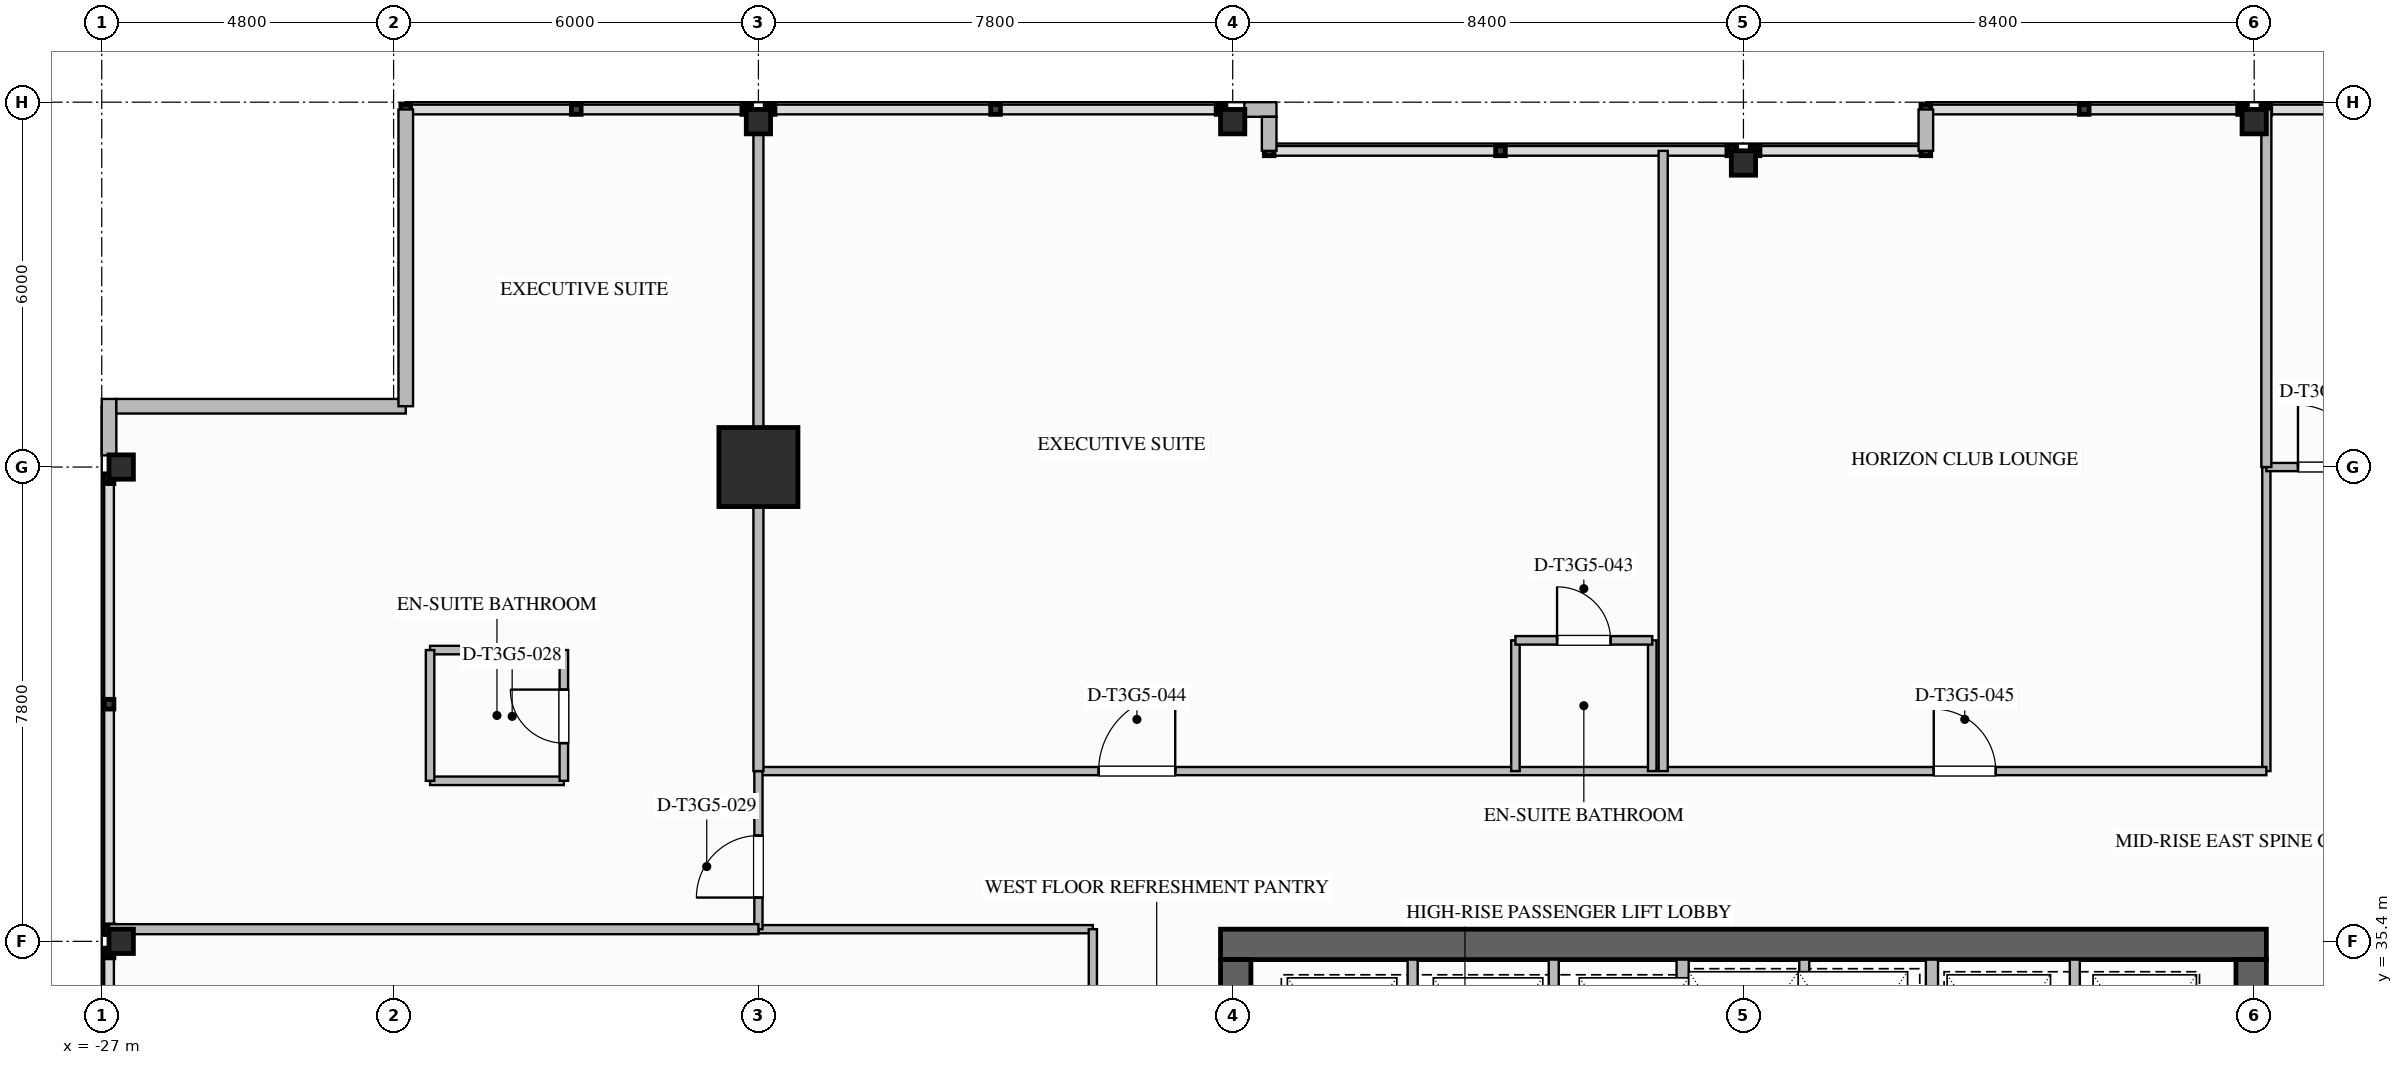
"""IFC4 building model, lengths in metres.
Left out: names, types, materials, properties, quantities, classifications, styles, units other than length and angle.
Written with IfcOpenShell. Run it as: python <this file> out.ifc"""

import sys

from ifc_helpers import new_model, si_unit, direction, frame, frame_2d, origin, origin_2d, place, context, subcontext, project, spatial, rectangle, i_section, extrude, element, fill, save


model = new_model("IFC4")
c1 = context("Model", 3, precision=1e-05, world=origin(), true_north=direction((0.0, 1.0)))
c2 = subcontext(c1, "Body", "Model", "MODEL_VIEW")
j1 = project(units=[si_unit("LENGTHUNIT", "METRE"), si_unit("PLANEANGLEUNIT", "RADIAN")], contexts=[c1])
p1 = place(None, origin())
s1 = spatial("IfcSite", under=j1, at=p1, CompositionType="ELEMENT")
p2 = place(p1, origin())
s2 = spatial("IfcBuilding", under=s1, at=p2, CompositionType="ELEMENT")
p3 = place(p2, frame((0.0, 0.0, 193.0)))
s3 = spatial("IfcBuildingStorey", under=s2, at=p3, CompositionType="ELEMENT", Elevation=193.0)
p4 = place(p3, frame((-8.6, 35.35, 0.0), z_axis=(0.0, 0.0, 1.0), x_axis=(1.0, 0.0, 0.0)))
e1 = element("IfcWall", 1, at=p4, inside=s3, PredefinedType="SHEAR", context=c2, shape_type="SweptSolid", body=[
    extrude(rectangle(XDim=17.2, YDim=0.5, at=frame_2d((8.6, 0.0))), origin(), (0.0, 0.0, 1.0), 3.55),
])
p5 = place(p3, frame((8.35, 35.1, 0.0), z_axis=(0.0, 0.0, 1.0), x_axis=(0.0, -1.0, 0.0)))
e2 = element("IfcWall", 2, at=p5, inside=s3, PredefinedType="SHEAR", context=c2, shape_type="SweptSolid", body=[
    extrude(rectangle(XDim=16.2, YDim=0.5, at=frame_2d((8.1, 0.0))), origin(), (0.0, 0.0, 1.0), 3.55),
])
p6 = place(p5, frame((3.08, 0.0, 0.0)))
e3 = element("IfcOpeningElement", 3, at=p6, cuts=e2, PredefinedType="OPENING", context=c2, shape_type="SweptSolid", body=[
    extrude(rectangle(XDim=1.12, YDim=2.1, at=frame_2d((0.56, 1.05))), frame((0.0, 0.26, 0.0), z_axis=(0.0, -1.0, 0.0), x_axis=(1.0, 0.0, 0.0)), (0.0, 0.0, 1.0), 0.52),
])
p7 = place(p5, frame((10.62, 0.0, 0.0)))
e4 = element("IfcOpeningElement", 4, at=p7, cuts=e2, PredefinedType="OPENING", context=c2, shape_type="SweptSolid", body=[
    extrude(rectangle(XDim=1.08, YDim=2.04, at=frame_2d((0.54, 1.02))), frame((0.0, 0.26, 0.0), z_axis=(0.0, -1.0, 0.0), x_axis=(1.0, 0.0, 0.0)), (0.0, 0.0, 1.0), 0.52),
])
p8 = place(p3, frame((-8.35, 18.9, 0.0), z_axis=(0.0, 0.0, 1.0), x_axis=(0.0, 1.0, 0.0)))
e5 = element("IfcWall", 5, at=p8, inside=s3, PredefinedType="SHEAR", context=c2, shape_type="SweptSolid", body=[
    extrude(rectangle(XDim=16.2, YDim=0.5, at=frame_2d((8.1, 0.0))), origin(), (0.0, 0.0, 1.0), 3.55),
])
p9 = place(p8, frame((12.02, 0.0, 0.0)))
e6 = element("IfcOpeningElement", 6, at=p9, cuts=e5, PredefinedType="OPENING", context=c2, shape_type="SweptSolid", body=[
    extrude(rectangle(XDim=1.08, YDim=2.04, at=frame_2d((0.54, 1.02))), frame((0.0, 0.26, 0.0), z_axis=(0.0, -1.0, 0.0), x_axis=(1.0, 0.0, 0.0)), (0.0, 0.0, 1.0), 0.52),
])
p10 = place(p8, frame((4.5, 0.0, 0.0)))
e7 = element("IfcOpeningElement", 7, at=p10, cuts=e5, PredefinedType="OPENING", context=c2, shape_type="SweptSolid", body=[
    extrude(rectangle(XDim=1.08, YDim=2.04, at=frame_2d((0.54, 1.02))), frame((0.0, 0.26, 0.0), z_axis=(0.0, -1.0, 0.0), x_axis=(1.0, 0.0, 0.0)), (0.0, 0.0, 1.0), 0.52),
])
p11 = place(p3, frame((-16.2, 43.2, 0.0), z_axis=(0.0, 0.0, 1.0), x_axis=(1.0, 0.0, 0.0)))
e8 = element("IfcColumn", 8, at=p11, inside=s3, PredefinedType="COLUMN", context=c2, shape_type="SweptSolid", body=[
    extrude(rectangle(XDim=1.3, YDim=1.3, at=origin_2d()), origin(), (0.0, 0.0, 1.0), 3.55),
])
for number, where, z_axis, x_axis in (
    (9, (-26.68, 35.4, 0.0), (0.0, 0.0, 1.0), (1.0, 0.0, 0.0)),
    (10, (-26.68, 43.2, 0.0), (0.0, 0.0, 1.0), (1.0, 0.0, 0.0)),
    (11, (-16.2, 48.88, 0.0), (0.0, 0.0, 1.0), (0.0, 1.0, 0.0)),
    (12, (-8.4, 48.88, 0.0), (0.0, 0.0, 1.0), (0.0, 1.0, 0.0)),
    (13, (0.0, 48.2, 0.0), (0.0, 0.0, 1.0), (0.0, 1.0, 0.0)),
    (14, (8.4, 48.88, 0.0), (0.0, 0.0, 1.0), (0.0, 1.0, 0.0)),
):
    element("IfcColumn", number, at=place(p3, frame(where, z_axis=z_axis, x_axis=x_axis)), inside=s3, PredefinedType="COLUMN", context=c2, shape_type="SweptSolid", body=[
        extrude(i_section(OverallWidth=0.401, OverallDepth=0.399, WebThickness=0.025, FlangeThickness=0.04, FilletRadius=0.025, at=origin_2d()), origin(), (0.0, 0.0, 1.0), 3.547),
    ])
p12 = place(p3, frame((-26.88, 43.392, 0.0), z_axis=(0.0, 0.0, 1.0), x_axis=(0.0, 1.0, 0.0)))
e15 = element("IfcWall", 15, at=p12, inside=s3, PredefinedType="STANDARD", context=c2, shape_type="SweptSolid", body=[
    extrude(rectangle(XDim=0.928, YDim=0.24, at=frame_2d((0.464, 0.0))), origin(), (0.0, 0.0, 1.0), 3.29),
])
p13 = place(p3, frame((-8.208, 49.08, 0.0), z_axis=(0.0, 0.0, 1.0), x_axis=(1.0, 0.0, 0.0)))
e16 = element("IfcWall", 16, at=p13, inside=s3, PredefinedType="STANDARD", context=c2, shape_type="SweptSolid", body=[
    extrude(rectangle(XDim=0.528, YDim=0.24, at=frame_2d((0.264, 0.0))), origin(), (0.0, 0.0, 1.0), 3.29),
])
p14 = place(p3, frame((-26.76, 44.2, 0.0), z_axis=(0.0, 0.0, 1.0), x_axis=(1.0, 0.0, 0.0)))
e17 = element("IfcWall", 17, at=p14, inside=s3, PredefinedType="STANDARD", context=c2, shape_type="SweptSolid", body=[
    extrude(rectangle(XDim=4.76, YDim=0.24, at=frame_2d((2.38, 0.0))), origin(), (0.0, 0.0, 1.0), 3.29),
])
p15 = place(p3, frame((-22.0, 44.2, 0.0), z_axis=(0.0, 0.0, 1.0), x_axis=(0.0, 1.0, 0.0)))
e18 = element("IfcWall", 18, at=p15, inside=s3, PredefinedType="STANDARD", context=c2, shape_type="SweptSolid", body=[
    extrude(rectangle(XDim=4.88, YDim=0.24, at=frame_2d((2.44, 0.0))), origin(), (0.0, 0.0, 1.0), 3.29),
])
p16 = place(p3, frame((-7.8, 48.96, 0.0), z_axis=(0.0, 0.0, 1.0), x_axis=(0.0, -1.0, 0.0)))
e19 = element("IfcWall", 19, at=p16, inside=s3, PredefinedType="STANDARD", context=c2, shape_type="SweptSolid", body=[
    extrude(rectangle(XDim=0.56, YDim=0.24, at=frame_2d((0.28, 0.0))), origin(), (0.0, 0.0, 1.0), 3.29),
])
p17 = place(p3, frame((3.0, 48.4, 0.0), z_axis=(0.0, 0.0, 1.0), x_axis=(0.0, 1.0, 0.0)))
e20 = element("IfcWall", 20, at=p17, inside=s3, PredefinedType="STANDARD", context=c2, shape_type="SweptSolid", body=[
    extrude(rectangle(XDim=0.68, YDim=0.24, at=frame_2d((0.34, 0.0))), origin(), (0.0, 0.0, 1.0), 3.29),
])
p18 = place(p3, frame((3.1, 32.22, 0.0), z_axis=(0.0, 0.0, 1.0), x_axis=(0.0, 1.0, 0.0)))
e21 = element("IfcWall", 21, at=p18, inside=s3, PredefinedType="SOLIDWALL", context=c2, shape_type="SweptSolid", body=[
    extrude(rectangle(XDim=2.88, YDim=0.2, at=frame_2d((1.44, 0.0))), origin(), (0.0, 0.0, 1.0), 3.29),
])
p19 = place(p3, frame((5.45, 32.22, 0.0), z_axis=(0.0, 0.0, 1.0), x_axis=(0.0, 1.0, 0.0)))
e22 = element("IfcWall", 22, at=p19, inside=s3, PredefinedType="PARTITIONING", context=c2, shape_type="SweptSolid", body=[
    extrude(rectangle(XDim=2.88, YDim=0.165, at=frame_2d((1.44, 0.0))), origin(), (0.0, 0.0, 1.0), 3.29),
])
p20 = place(p3, frame((-1.0, 32.18, 0.0), z_axis=(0.0, 0.0, 1.0), x_axis=(0.0, 1.0, 0.0)))
e23 = element("IfcWall", 23, at=p20, inside=s3, PredefinedType="SOLIDWALL", context=c2, shape_type="SweptSolid", body=[
    extrude(rectangle(XDim=2.92, YDim=0.2, at=frame_2d((1.46, 0.0))), origin(), (0.0, 0.0, 1.0), 3.29),
])
p21 = place(p3, frame((1.0, 32.18, 0.0), z_axis=(0.0, 0.0, 1.0), x_axis=(0.0, 1.0, 0.0)))
e24 = element("IfcWall", 24, at=p21, inside=s3, PredefinedType="PARTITIONING", context=c2, shape_type="SweptSolid", body=[
    extrude(rectangle(XDim=2.92, YDim=0.165, at=frame_2d((1.46, 0.0))), origin(), (0.0, 0.0, 1.0), 3.29),
])
for number, where, z_axis, x_axis in (
    (25, (-5.44, 32.22, 0.0), (0.0, 0.0, 1.0), (0.0, 1.0, 0.0)),
    (26, (-3.12, 32.22, 0.0), (0.0, 0.0, 1.0), (0.0, 1.0, 0.0)),
):
    element("IfcWall", number, at=place(p3, frame(where, z_axis=z_axis, x_axis=x_axis)), inside=s3, PredefinedType="PARTITIONING", context=c2, shape_type="SweptSolid", body=[
        extrude(rectangle(XDim=2.88, YDim=0.165, at=frame_2d((1.44, 0.0))), origin(), (0.0, 0.0, 1.0), 3.29),
    ])
p22 = place(p3, frame((8.6, 38.2, 0.0), z_axis=(0.0, 0.0, 1.0), x_axis=(0.0, 1.0, 0.0)))
e27 = element("IfcWall", 27, at=p22, inside=s3, PredefinedType="PARTITIONING", context=c2, shape_type="SweptSolid", body=[
    extrude(rectangle(XDim=5.0, YDim=0.135, at=frame_2d((2.5, 0.0))), origin(), (0.0, 0.0, 1.0), 2.667),
])
p23 = place(p3, frame((-16.2, 35.6, 0.0), z_axis=(0.0, 0.0, 1.0), x_axis=(1.0, 0.0, 0.0)))
e28 = element("IfcWall", 28, at=p23, inside=s3, PredefinedType="PARTITIONING", context=c2, shape_type="SweptSolid", body=[
    extrude(rectangle(XDim=5.5, YDim=0.135, at=frame_2d((2.75, 0.0))), origin(), (0.0, 0.0, 1.0), 2.667),
])
p24 = place(p3, frame((-16.2, 38.2, 0.0), z_axis=(0.0, 0.0, 1.0), x_axis=(1.0, 0.0, 0.0)))
e29 = element("IfcWall", 29, at=p24, inside=s3, PredefinedType="PARTITIONING", context=c2, shape_type="SweptSolid", body=[
    extrude(rectangle(XDim=24.8, YDim=0.135, at=frame_2d((12.4, 0.0))), origin(), (0.0, 0.0, 1.0), 3.29),
])
p25 = place(p24, frame((5.595, 0.0, 0.0)))
e30 = element("IfcOpeningElement", 30, at=p25, cuts=e29, PredefinedType="OPENING", context=c2, shape_type="SweptSolid", body=[
    extrude(rectangle(XDim=1.26, YDim=2.2, at=frame_2d((0.63, 1.1))), frame((0.0, 0.077, 0.0), z_axis=(0.0, -1.0, 0.0), x_axis=(1.0, 0.0, 0.0)), (0.0, 0.0, 1.0), 0.155),
])
p26 = place(p24, frame((19.33, 0.0, 0.0)))
e31 = element("IfcOpeningElement", 31, at=p26, cuts=e29, PredefinedType="OPENING", context=c2, shape_type="SweptSolid", body=[
    extrude(rectangle(XDim=1.02, YDim=2.15, at=frame_2d((0.51, 1.075))), frame((0.0, 0.077, 0.0), z_axis=(0.0, -1.0, 0.0), x_axis=(1.0, 0.0, 0.0)), (0.0, 0.0, 1.0), 0.155),
])
p27 = place(p3, frame((-10.7, 18.4, 0.0), z_axis=(0.0, 0.0, 1.0), x_axis=(0.0, 1.0, 0.0)))
e32 = element("IfcWall", 32, at=p27, inside=s3, PredefinedType="PARTITIONING", context=c2, shape_type="SweptSolid", body=[
    extrude(rectangle(XDim=17.2, YDim=0.135, at=frame_2d((8.6, 0.0))), origin(), (0.0, 0.0, 1.0), 3.29),
])
p28 = place(p27, frame((4.255, 0.0, 0.0)))
e33 = element("IfcOpeningElement", 33, at=p28, cuts=e32, PredefinedType="OPENING", context=c2, shape_type="SweptSolid", body=[
    extrude(rectangle(XDim=1.26, YDim=2.2, at=frame_2d((0.63, 1.1))), frame((0.0, 0.077, 0.0), z_axis=(0.0, -1.0, 0.0), x_axis=(1.0, 0.0, 0.0)), (0.0, 0.0, 1.0), 0.155),
])
p29 = place(p27, frame((11.685, 0.0, 0.0)))
e34 = element("IfcOpeningElement", 34, at=p29, cuts=e32, PredefinedType="OPENING", context=c2, shape_type="SweptSolid", body=[
    extrude(rectangle(XDim=1.26, YDim=2.2, at=frame_2d((0.63, 1.1))), frame((0.0, 0.077, 0.0), z_axis=(0.0, -1.0, 0.0), x_axis=(1.0, 0.0, 0.0)), (0.0, 0.0, 1.0), 0.155),
])
p30 = place(p3, frame((-16.2, 35.6, 0.0), z_axis=(0.0, 0.0, 1.0), x_axis=(0.0, 1.0, 0.0)))
e35 = element("IfcWall", 35, at=p30, inside=s3, PredefinedType="PARTITIONING", context=c2, shape_type="SweptSolid", body=[
    extrude(rectangle(XDim=2.6, YDim=0.135, at=frame_2d((1.3, 0.0))), origin(), (0.0, 0.0, 1.0), 2.58),
])
p31 = place(p30, frame((0.52, 0.0, 0.0)))
e36 = element("IfcOpeningElement", 36, at=p31, cuts=e35, PredefinedType="OPENING", context=c2, shape_type="SweptSolid", body=[
    extrude(rectangle(XDim=1.02, YDim=2.15, at=frame_2d((0.51, 1.075))), frame((0.0, 0.077, 0.0), z_axis=(0.0, -1.0, 0.0), x_axis=(1.0, 0.0, 0.0)), (0.0, 0.0, 1.0), 0.155),
])
p32 = place(p3, frame((8.6, 43.2, 0.0), z_axis=(0.0, 0.0, 1.0), x_axis=(1.0, 0.0, 0.0)))
e37 = element("IfcWall", 37, at=p32, inside=s3, PredefinedType="PARTITIONING", context=c2, shape_type="SweptSolid", body=[
    extrude(rectangle(XDim=2.95, YDim=0.135, at=frame_2d((1.475, 0.0))), origin(), (0.0, 0.0, 1.0), 2.58),
])
p33 = place(p32, frame((0.52, 0.0, 0.0)))
e38 = element("IfcOpeningElement", 38, at=p33, cuts=e37, PredefinedType="OPENING", context=c2, shape_type="SweptSolid", body=[
    extrude(rectangle(XDim=1.02, YDim=2.15, at=frame_2d((0.51, 1.075))), frame((0.0, 0.077, 0.0), z_axis=(0.0, -1.0, 0.0), x_axis=(1.0, 0.0, 0.0)), (0.0, 0.0, 1.0), 0.155),
])
p34 = place(p3, frame((-16.2, 38.2, 0.0), z_axis=(0.0, 0.0, 1.0), x_axis=(0.0, 1.0, 0.0)))
e39 = element("IfcWall", 39, at=p34, inside=s3, PredefinedType="PARTITIONING", context=c2, shape_type="SweptSolid", body=[
    extrude(rectangle(XDim=10.88, YDim=0.165, at=frame_2d((5.44, 0.0))), origin(), (0.0, 0.0, 1.0), 2.58),
])
p35 = place(p3, frame((8.6, 43.2, 0.0), z_axis=(0.0, 0.0, 1.0), x_axis=(0.0, 1.0, 0.0)))
e40 = element("IfcWall", 40, at=p35, inside=s3, PredefinedType="PARTITIONING", context=c2, shape_type="SweptSolid", body=[
    extrude(rectangle(XDim=5.88, YDim=0.165, at=frame_2d((2.94, 0.0))), origin(), (0.0, 0.0, 1.0), 2.58),
])
p36 = place(p3, frame((-26.88, 35.6, 0.0), z_axis=(0.0, 0.0, 1.0), x_axis=(1.0, 0.0, 0.0)))
e41 = element("IfcWall", 41, at=p36, inside=s3, PredefinedType="PARTITIONING", context=c2, shape_type="SweptSolid", body=[
    extrude(rectangle(XDim=10.68, YDim=0.165, at=frame_2d((5.34, 0.0))), origin(), (0.0, 0.0, 1.0), 2.58),
])
for number, where, z_axis, x_axis in (
    (42, (-21.6, 38.04, 0.0), (0.0, 0.0, 1.0), (1.0, 0.0, 0.0)),
    (43, (-21.6, 40.19, 0.0), (0.0, 0.0, 1.0), (1.0, 0.0, 0.0)),
):
    element("IfcWall", number, at=place(p3, frame(where, z_axis=z_axis, x_axis=x_axis)), inside=s3, PredefinedType="PLUMBINGWALL", context=c2, shape_type="SweptSolid", body=[
        extrude(rectangle(XDim=2.2, YDim=0.14, at=frame_2d((1.1, 0.0))), origin(), (0.0, 0.0, 1.0), 3.29),
    ])
p37 = place(p3, frame((-21.6, 38.04, 0.0), z_axis=(0.0, 0.0, 1.0), x_axis=(0.0, 1.0, 0.0)))
e44 = element("IfcWall", 44, at=p37, inside=s3, PredefinedType="PLUMBINGWALL", context=c2, shape_type="SweptSolid", body=[
    extrude(rectangle(XDim=2.15, YDim=0.14, at=frame_2d((1.075, 0.0))), origin(), (0.0, 0.0, 1.0), 3.29),
])
p38 = place(p3, frame((-19.4, 38.04, 0.0), z_axis=(0.0, 0.0, 1.0), x_axis=(0.0, 1.0, 0.0)))
e45 = element("IfcWall", 45, at=p38, inside=s3, PredefinedType="PLUMBINGWALL", context=c2, shape_type="SweptSolid", body=[
    extrude(rectangle(XDim=2.15, YDim=0.14, at=frame_2d((1.075, 0.0))), origin(), (0.0, 0.0, 1.0), 3.29),
])
p39 = place(p38, frame((0.62, 0.0, 0.0)))
e46 = element("IfcOpeningElement", 46, at=p39, cuts=e45, PredefinedType="OPENING", context=c2, shape_type="SweptSolid", body=[
    extrude(rectangle(XDim=0.88, YDim=2.1, at=frame_2d((0.44, 1.05))), frame((0.0, 0.08, 0.0), z_axis=(0.0, -1.0, 0.0), x_axis=(1.0, 0.0, 0.0)), (0.0, 0.0, 1.0), 0.16),
])
for number, where, z_axis, x_axis in (
    (47, (-3.75, 38.2, 0.0), (0.0, 0.0, 1.0), (0.0, 1.0, 0.0)),
    (48, (-1.5, 38.2, 0.0), (0.0, 0.0, 1.0), (0.0, 1.0, 0.0)),
):
    element("IfcWall", number, at=place(p3, frame(where, z_axis=z_axis, x_axis=x_axis)), inside=s3, PredefinedType="PLUMBINGWALL", context=c2, shape_type="SweptSolid", body=[
        extrude(rectangle(XDim=2.15, YDim=0.14, at=frame_2d((1.075, 0.0))), origin(), (0.0, 0.0, 1.0), 3.29),
    ])
p40 = place(p3, frame((-3.75, 40.35, 0.0), z_axis=(0.0, 0.0, 1.0), x_axis=(1.0, 0.0, 0.0)))
e49 = element("IfcWall", 49, at=p40, inside=s3, PredefinedType="PLUMBINGWALL", context=c2, shape_type="SweptSolid", body=[
    extrude(rectangle(XDim=2.25, YDim=0.14, at=frame_2d((1.125, 0.0))), origin(), (0.0, 0.0, 1.0), 3.29),
])
p41 = place(p40, frame((0.685, 0.0, 0.0)))
e50 = element("IfcOpeningElement", 50, at=p41, cuts=e49, PredefinedType="OPENING", context=c2, shape_type="SweptSolid", body=[
    extrude(rectangle(XDim=0.88, YDim=2.1, at=frame_2d((0.44, 1.05))), frame((0.0, 0.08, 0.0), z_axis=(0.0, -1.0, 0.0), x_axis=(1.0, 0.0, 0.0)), (0.0, 0.0, 1.0), 0.16),
])
p42 = place(p3, frame((-1.32, 38.2, 0.0), z_axis=(0.0, 0.0, 1.0), x_axis=(0.0, 1.0, 0.0)))
e51 = element("IfcWall", 51, at=p42, inside=s3, PredefinedType="PARTITIONING", context=c2, shape_type="SweptSolid", body=[
    extrude(rectangle(XDim=10.2, YDim=0.15, at=frame_2d((5.1, 0.0))), origin(), (0.0, 0.0, 1.0), 3.29),
])
p43 = place(p39, origin())
e52 = element("IfcDoor", 52, at=p43, inside=s3, OperationType="SINGLE_SWING_RIGHT", PredefinedType="DOOR", context=c2, shape_type="SweptSolid", body=[
    extrude(rectangle(XDim=0.88, YDim=2.1, at=frame_2d((0.44, 1.05))), frame((0.0, 0.025, 0.0), z_axis=(0.0, -1.0, 0.0), x_axis=(1.0, 0.0, 0.0)), (0.0, 0.0, 1.0), 0.05),
])
fill(e46, e52)
p44 = place(p31, origin())
e53 = element("IfcDoor", 53, at=p44, inside=s3, OperationType="SINGLE_SWING_LEFT", PredefinedType="DOOR", context=c2, shape_type="SweptSolid", body=[
    extrude(rectangle(XDim=1.02, YDim=2.15, at=frame_2d((0.51, 1.075))), frame((0.0, 0.025, 0.0), z_axis=(0.0, -1.0, 0.0), x_axis=(1.0, 0.0, 0.0)), (0.0, 0.0, 1.0), 0.05),
])
fill(e36, e53)
p45 = place(p33, origin())
e54 = element("IfcDoor", 54, at=p45, inside=s3, OperationType="SINGLE_SWING_LEFT", PredefinedType="DOOR", context=c2, shape_type="SweptSolid", body=[
    extrude(rectangle(XDim=1.02, YDim=2.15, at=frame_2d((0.51, 1.075))), frame((0.0, 0.025, 0.0), z_axis=(0.0, -1.0, 0.0), x_axis=(1.0, 0.0, 0.0)), (0.0, 0.0, 1.0), 0.05),
])
fill(e38, e54)
p46 = place(p41, origin())
e55 = element("IfcDoor", 55, at=p46, inside=s3, OperationType="SINGLE_SWING_LEFT", PredefinedType="DOOR", context=c2, shape_type="SweptSolid", body=[
    extrude(rectangle(XDim=0.88, YDim=2.1, at=frame_2d((0.44, 1.05))), frame((0.0, 0.025, 0.0), z_axis=(0.0, -1.0, 0.0), x_axis=(1.0, 0.0, 0.0)), (0.0, 0.0, 1.0), 0.05),
])
fill(e50, e55)
p47 = place(p25, origin())
e56 = element("IfcDoor", 56, at=p47, inside=s3, OperationType="SINGLE_SWING_RIGHT", PredefinedType="DOOR", context=c2, shape_type="SweptSolid", body=[
    extrude(rectangle(XDim=1.26, YDim=2.2, at=frame_2d((0.63, 1.1))), frame((0.0, 0.025, 0.0), z_axis=(0.0, -1.0, 0.0), x_axis=(1.0, 0.0, 0.0)), (0.0, 0.0, 1.0), 0.05),
])
fill(e30, e56)
p48 = place(p26, origin())
e57 = element("IfcDoor", 57, at=p48, inside=s3, OperationType="SINGLE_SWING_LEFT", PredefinedType="DOOR", context=c2, shape_type="SweptSolid", body=[
    extrude(rectangle(XDim=1.02, YDim=2.15, at=frame_2d((0.51, 1.075))), frame((0.0, 0.025, 0.0), z_axis=(0.0, -1.0, 0.0), x_axis=(1.0, 0.0, 0.0)), (0.0, 0.0, 1.0), 0.05),
])
fill(e31, e57)
save(model, sys.argv[1])
